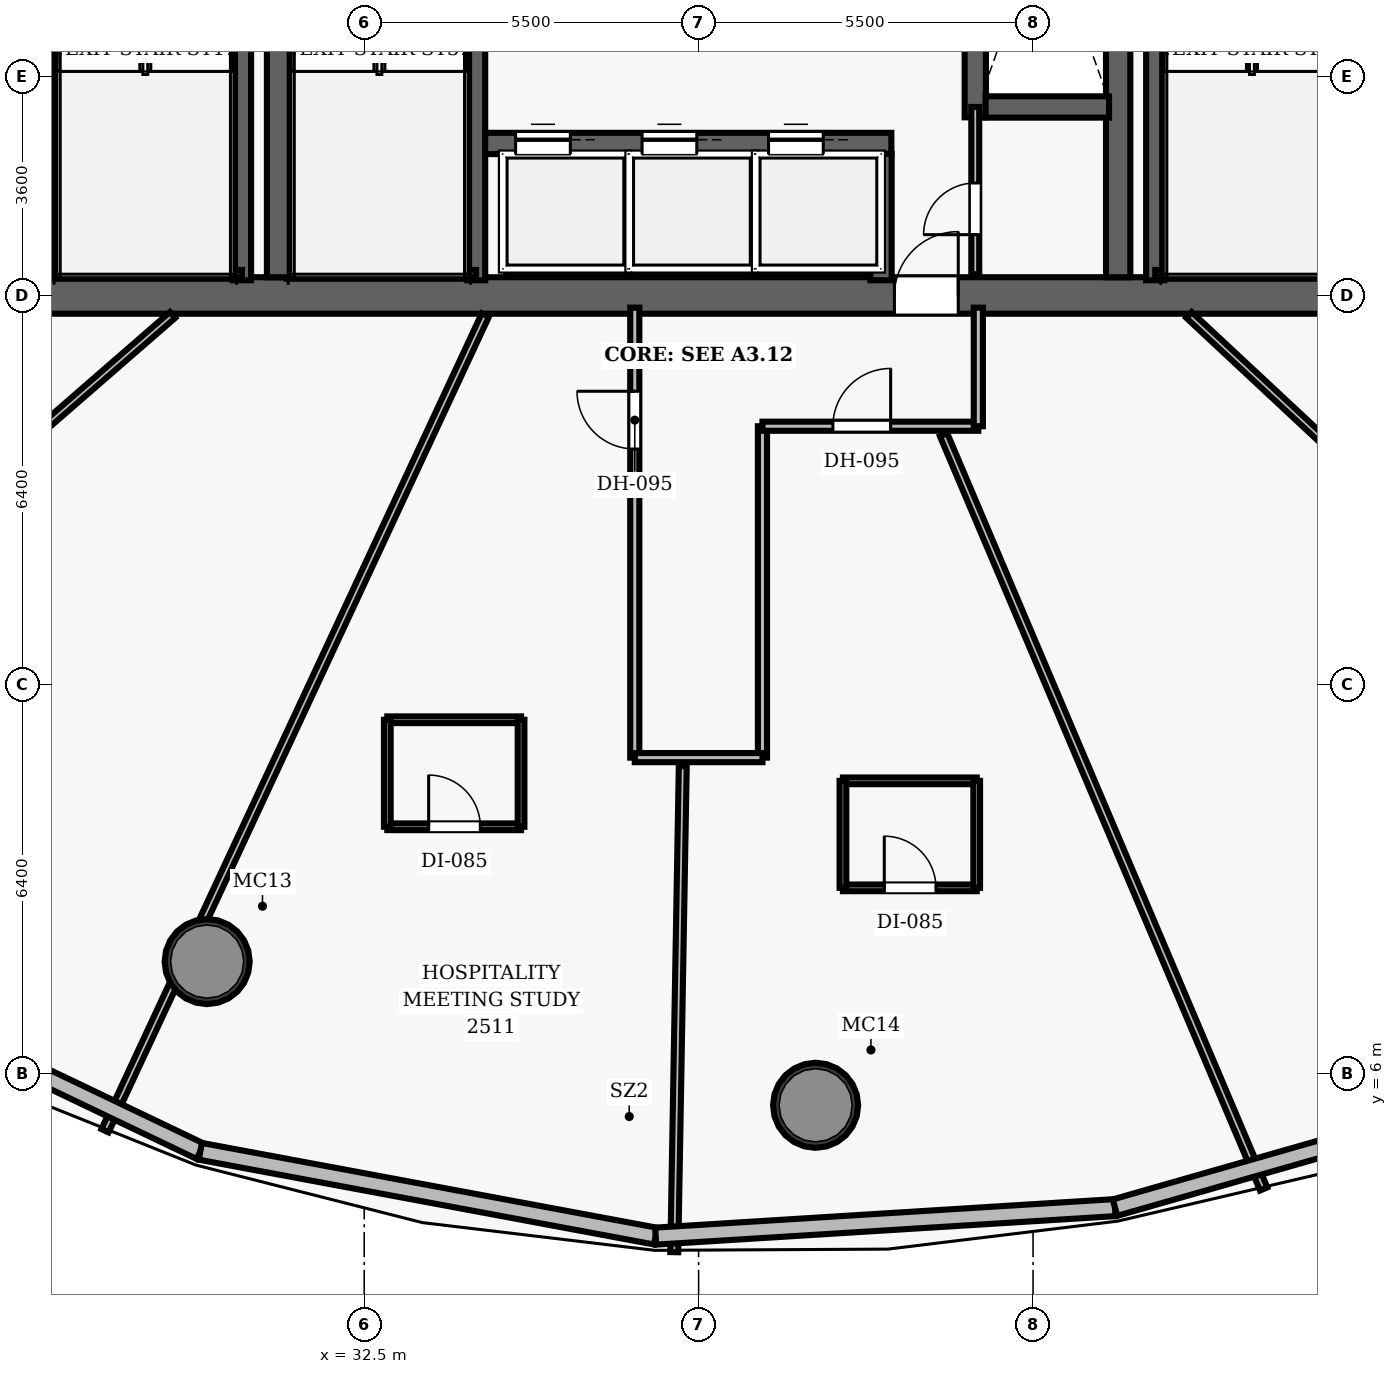
"""IFC4 building model, lengths in metres.
Left out: names, types, materials, properties, quantities, classifications, styles, units other than length and angle.
Written with IfcOpenShell. Run it as: python <this file> out.ifc"""

import sys

from ifc_helpers import new_model, si_unit, direction, frame, frame_2d, origin, origin_2d, place, context, subcontext, project, spatial, rectangle, hollow_circle, extrude, element, fill, save


model = new_model("IFC4")
c1 = context("Model", 3, precision=1e-05, world=origin(), true_north=direction((0.0, 1.0)))
c2 = subcontext(c1, "Body", "Model", "MODEL_VIEW")
j1 = project(units=[si_unit("LENGTHUNIT", "METRE"), si_unit("PLANEANGLEUNIT", "RADIAN")], contexts=[c1])
p1 = place(None, origin())
s1 = spatial("IfcSite", under=j1, at=p1, CompositionType="ELEMENT")
p2 = place(p1, origin())
s2 = spatial("IfcBuilding", under=s1, at=p2, CompositionType="ELEMENT")
p3 = place(p2, frame((0.0, 0.0, 106.3)))
s3 = spatial("IfcBuildingStorey", under=s2, at=p3, CompositionType="ELEMENT", Elevation=106.3)
p4 = place(p3, frame((26.7, 18.8, 0.0), z_axis=(0.0, 0.0, 1.0), x_axis=(1.0, 0.0, 0.0)))
e1 = element("IfcWall", 1, at=p4, inside=s3, PredefinedType="SHEAR", context=c2, shape_type="SweptSolid", body=[
    extrude(rectangle(XDim=22.6, YDim=0.6, at=frame_2d((11.3, 0.0))), origin(), (0.0, 0.0, 1.0), 3.5),
])
p5 = place(p4, frame((14.52, 0.0, 0.0)))
e2 = element("IfcOpeningElement", 2, at=p5, cuts=e1, PredefinedType="OPENING", context=c2, shape_type="SweptSolid", body=[
    extrude(rectangle(XDim=1.05, YDim=2.15, at=frame_2d((0.525, 1.075))), frame((0.0, 0.31, 0.0), z_axis=(0.0, -1.0, 0.0), x_axis=(1.0, 0.0, 0.0)), (0.0, 0.0, 1.0), 0.62),
])
for number, where, z_axis, x_axis in (
    (3, (31.1, 19.1, 0.0), (0.0, 0.0, 1.0), (0.0, 1.0, 0.0)),
    (4, (44.9, 19.1, 0.0), (0.0, 0.0, 1.0), (0.0, 1.0, 0.0)),
):
    element("IfcWall", number, at=place(p3, frame(where, z_axis=z_axis, x_axis=x_axis)), inside=s3, PredefinedType="SHEAR", context=c2, shape_type="SweptSolid", body=[
        extrude(rectangle(XDim=13.8, YDim=0.4, at=frame_2d((6.9, 0.0))), origin(), (0.0, 0.0, 1.0), 3.5),
    ])
for number, where, z_axis, x_axis in (
    (5, (29.917, 7.846, 0.0), (0.0, 0.0, 1.0), (1.0, 0.0, 0.0)),
    (6, (39.924, 5.483, 0.0), (0.0, 0.0, 1.0), (1.0, 0.0, 0.0)),
):
    element("IfcColumn", number, at=place(p3, frame(where, z_axis=z_axis, x_axis=x_axis)), inside=s3, PredefinedType="COLUMN", context=c2, shape_type="SweptSolid", body=[
        extrude(hollow_circle(Radius=0.7, WallThickness=0.055, at=origin_2d()), origin(), (0.0, 0.0, 1.0), 3.5),
    ])
p6 = place(p3, frame((30.49, 19.05, 0.0), z_axis=(0.0, 0.0, 1.0), x_axis=(0.0, 1.0, 0.0)))
e7 = element("IfcWall", 7, at=p6, inside=s3, PredefinedType="SHEAR", context=c2, shape_type="SweptSolid", body=[
    extrude(rectangle(XDim=7.5, YDim=0.3, at=frame_2d((3.75, 0.0))), origin(), (0.0, 0.0, 1.0), 3.5),
])
p7 = place(p3, frame((27.395, 19.1, 0.0), z_axis=(0.0, 0.0, 1.0), x_axis=(0.0, 1.0, 0.0)))
e8 = element("IfcWall", 8, at=p7, inside=s3, PredefinedType="SHEAR", context=c2, shape_type="SweptSolid", body=[
    extrude(rectangle(XDim=7.45, YDim=0.12, at=frame_2d((3.725, 0.0))), origin(), (0.0, 0.0, 1.0), 3.5),
])
p8 = place(p3, frame((27.395, 19.16, 0.0), z_axis=(0.0, 0.0, 1.0), x_axis=(1.0, 0.0, 0.0)))
e9 = element("IfcWall", 9, at=p8, inside=s3, PredefinedType="SHEAR", context=c2, shape_type="SweptSolid", body=[
    extrude(rectangle(XDim=3.095, YDim=0.12, at=frame_2d((1.547, 0.0))), origin(), (0.0, 0.0, 1.0), 3.5),
])
p9 = place(p3, frame((45.51, 19.05, 0.0), z_axis=(0.0, 0.0, 1.0), x_axis=(0.0, 1.0, 0.0)))
e10 = element("IfcWall", 10, at=p9, inside=s3, PredefinedType="SHEAR", context=c2, shape_type="SweptSolid", body=[
    extrude(rectangle(XDim=7.5, YDim=0.3, at=frame_2d((3.75, 0.0))), origin(), (0.0, 0.0, 1.0), 3.5),
])
p10 = place(p3, frame((45.51, 19.16, 0.0), z_axis=(0.0, 0.0, 1.0), x_axis=(1.0, 0.0, 0.0)))
e11 = element("IfcWall", 11, at=p10, inside=s3, PredefinedType="SHEAR", context=c2, shape_type="SweptSolid", body=[
    extrude(rectangle(XDim=3.095, YDim=0.12, at=frame_2d((1.547, 0.0))), origin(), (0.0, 0.0, 1.0), 3.5),
])
p11 = place(p3, frame((34.34, 19.05, 0.0), z_axis=(0.0, 0.0, 1.0), x_axis=(0.0, 1.0, 0.0)))
e12 = element("IfcWall", 12, at=p11, inside=s3, PredefinedType="SHEAR", context=c2, shape_type="SweptSolid", body=[
    extrude(rectangle(XDim=7.5, YDim=0.3, at=frame_2d((3.75, 0.0))), origin(), (0.0, 0.0, 1.0), 3.5),
])
p12 = place(p3, frame((31.3, 19.16, 0.0), z_axis=(0.0, 0.0, 1.0), x_axis=(1.0, 0.0, 0.0)))
e13 = element("IfcWall", 13, at=p12, inside=s3, PredefinedType="SHEAR", context=c2, shape_type="SweptSolid", body=[
    extrude(rectangle(XDim=3.04, YDim=0.12, at=frame_2d((1.52, 0.0))), origin(), (0.0, 0.0, 1.0), 3.5),
])
p13 = place(p3, frame((42.55, 21.73, 0.0), z_axis=(0.0, 0.0, 1.0), x_axis=(0.0, 1.0, 0.0)))
e14 = element("IfcWall", 14, at=p13, inside=s3, PredefinedType="SHEAR", context=c2, shape_type="SweptSolid", body=[
    extrude(rectangle(XDim=6.54, YDim=0.35, at=frame_2d((3.27, 0.0))), origin(), (0.0, 0.0, 1.0), 2.675),
])
p14 = place(p3, frame((42.72, 21.9, 0.0), z_axis=(0.0, 0.0, 1.0), x_axis=(1.0, 0.0, 0.0)))
e15 = element("IfcWall", 15, at=p14, inside=s3, PredefinedType="SHEAR", context=c2, shape_type="SweptSolid", body=[
    extrude(rectangle(XDim=2.03, YDim=0.35, at=frame_2d((1.015, 0.0))), origin(), (0.0, 0.0, 1.0), 2.675),
])
p15 = place(p3, frame((34.49, 21.3, 0.0), z_axis=(0.0, 0.0, 1.0), x_axis=(1.0, 0.0, 0.0)))
e16 = element("IfcWall", 16, at=p15, inside=s3, PredefinedType="SHEAR", context=c2, shape_type="SweptSolid", body=[
    extrude(rectangle(XDim=6.68, YDim=0.35, at=frame_2d((3.34, 0.0))), origin(), (0.0, 0.0, 1.0), 2.675),
])
p16 = place(p15, frame((0.5, 0.0, 0.0)))
e17 = element("IfcOpeningElement", 17, at=p16, cuts=e16, PredefinedType="OPENING", context=c2, shape_type="SweptSolid", body=[
    extrude(rectangle(XDim=0.9, YDim=2.15, at=frame_2d((0.45, 1.075))), frame((0.0, 0.185, 0.0), z_axis=(0.0, -1.0, 0.0), x_axis=(1.0, 0.0, 0.0)), (0.0, 0.0, 1.0), 0.37),
])
p17 = place(p15, frame((2.58, 0.0, 0.0)))
e18 = element("IfcOpeningElement", 18, at=p17, cuts=e16, PredefinedType="OPENING", context=c2, shape_type="SweptSolid", body=[
    extrude(rectangle(XDim=0.9, YDim=2.15, at=frame_2d((0.45, 1.075))), frame((0.0, 0.185, 0.0), z_axis=(0.0, -1.0, 0.0), x_axis=(1.0, 0.0, 0.0)), (0.0, 0.0, 1.0), 0.37),
])
p18 = place(p15, frame((4.66, 0.0, 0.0)))
e19 = element("IfcOpeningElement", 19, at=p18, cuts=e16, PredefinedType="OPENING", context=c2, shape_type="SweptSolid", body=[
    extrude(rectangle(XDim=0.9, YDim=2.15, at=frame_2d((0.45, 1.075))), frame((0.0, 0.185, 0.0), z_axis=(0.0, -1.0, 0.0), x_axis=(1.0, 0.0, 0.0)), (0.0, 0.0, 1.0), 0.37),
])
p19 = place(p3, frame((41.0, 19.05, 0.0), z_axis=(0.0, 0.0, 1.0), x_axis=(0.0, 1.0, 0.0)))
e20 = element("IfcWall", 20, at=p19, inside=s3, PredefinedType="SHEAR", context=c2, shape_type="SweptSolid", body=[
    extrude(rectangle(XDim=2.08, YDim=0.35, at=frame_2d((1.04, 0.0))), origin(), (0.0, 0.0, 1.0), 2.675),
])
p20 = place(p3, frame((42.55, 19.15, 0.0), z_axis=(0.0, 0.0, 1.0), x_axis=(0.0, 1.0, 0.0)))
e21 = element("IfcWall", 21, at=p20, inside=s3, PredefinedType="PARTITIONING", context=c2, shape_type="SweptSolid", body=[
    extrude(rectangle(XDim=2.75, YDim=0.13, at=frame_2d((1.375, 0.0))), origin(), (0.0, 0.0, 1.0), 2.675),
])
p21 = place(p20, frame((0.65, 0.0, 0.0)))
e22 = element("IfcOpeningElement", 22, at=p21, cuts=e21, PredefinedType="OPENING", context=c2, shape_type="SweptSolid", body=[
    extrude(rectangle(XDim=0.85, YDim=2.1, at=frame_2d((0.425, 1.05))), frame((0.0, 0.075, 0.0), z_axis=(0.0, -1.0, 0.0), x_axis=(1.0, 0.0, 0.0)), (0.0, 0.0, 1.0), 0.15),
])
p22 = place(p3, frame((36.95, 11.2, 0.0), z_axis=(0.0, 0.0, 1.0), x_axis=(0.0, 1.0, 0.0)))
e23 = element("IfcWall", 23, at=p22, inside=s3, PredefinedType="PARTITIONING", context=c2, shape_type="SweptSolid", body=[
    extrude(rectangle(XDim=7.4, YDim=0.15, at=frame_2d((3.7, 0.0))), origin(), (0.0, 0.0, 1.0), 2.675),
])
p23 = place(p22, frame((5.075, 0.0, 0.0)))
e24 = element("IfcOpeningElement", 24, at=p23, cuts=e23, PredefinedType="OPENING", context=c2, shape_type="SweptSolid", body=[
    extrude(rectangle(XDim=0.95, YDim=2.15, at=frame_2d((0.475, 1.075))), frame((0.0, 0.085, 0.0), z_axis=(0.0, -1.0, 0.0), x_axis=(1.0, 0.0, 0.0)), (0.0, 0.0, 1.0), 0.17),
])
p24 = place(p3, frame((39.05, 11.2, 0.0), z_axis=(0.0, 0.0, 1.0), x_axis=(0.0, 1.0, 0.0)))
e25 = element("IfcWall", 25, at=p24, inside=s3, PredefinedType="PARTITIONING", context=c2, shape_type="SweptSolid", body=[
    extrude(rectangle(XDim=5.45, YDim=0.15, at=frame_2d((2.725, 0.0))), origin(), (0.0, 0.0, 1.0), 2.675),
])
p25 = place(p3, frame((39.05, 16.65, 0.0), z_axis=(0.0, 0.0, 1.0), x_axis=(1.0, 0.0, 0.0)))
e26 = element("IfcWall", 26, at=p25, inside=s3, PredefinedType="PARTITIONING", context=c2, shape_type="SweptSolid", body=[
    extrude(rectangle(XDim=3.55, YDim=0.15, at=frame_2d((1.775, 0.0))), origin(), (0.0, 0.0, 1.0), 2.675),
])
p26 = place(p25, frame((1.158, 0.0, 0.0)))
e27 = element("IfcOpeningElement", 27, at=p26, cuts=e26, PredefinedType="OPENING", context=c2, shape_type="SweptSolid", body=[
    extrude(rectangle(XDim=0.95, YDim=2.15, at=frame_2d((0.475, 1.075))), frame((0.0, 0.085, 0.0), z_axis=(0.0, -1.0, 0.0), x_axis=(1.0, 0.0, 0.0)), (0.0, 0.0, 1.0), 0.17),
])
p27 = place(p3, frame((42.6, 16.65, 0.0), z_axis=(0.0, 0.0, 1.0), x_axis=(0.0, 1.0, 0.0)))
e28 = element("IfcWall", 28, at=p27, inside=s3, PredefinedType="PARTITIONING", context=c2, shape_type="SweptSolid", body=[
    extrude(rectangle(XDim=1.95, YDim=0.15, at=frame_2d((0.975, 0.0))), origin(), (0.0, 0.0, 1.0), 2.675),
])
p28 = place(p3, frame((36.95, 11.2, 0.0), z_axis=(0.0, 0.0, 1.0), x_axis=(1.0, 0.0, 0.0)))
e29 = element("IfcWall", 29, at=p28, inside=s3, PredefinedType="PARTITIONING", context=c2, shape_type="SweptSolid", body=[
    extrude(rectangle(XDim=2.1, YDim=0.15, at=frame_2d((1.05, 0.0))), origin(), (0.0, 0.0, 1.0), 2.675),
])
p29 = place(p3, frame((29.349, 18.48, 0.0), z_axis=(0.0, 0.0, 1.0), x_axis=(-0.754706894701, -0.656062118317, 0.0)))
e30 = element("IfcWall", 30, at=p29, inside=s3, PredefinedType="PARTITIONING", context=c2, shape_type="SweptSolid", body=[
    extrude(rectangle(XDim=12.805, YDim=0.13, at=frame_2d((6.403, 0.0))), origin(), (0.0, 0.0, 1.0), 2.675),
])
p30 = place(p3, frame((34.493, 18.48, 0.0), z_axis=(0.0, 0.0, 1.0), x_axis=(-0.422624514594, -0.906304871257, 0.0)))
e31 = element("IfcWall", 31, at=p30, inside=s3, PredefinedType="PARTITIONING", context=c2, shape_type="SweptSolid", body=[
    extrude(rectangle(XDim=14.803, YDim=0.13, at=frame_2d((7.401, 0.0))), origin(), (0.0, 0.0, 1.0), 2.675),
])
p31 = place(p3, frame((37.739, 11.06, 0.0), z_axis=(0.0, 0.0, 1.0), x_axis=(-0.017468317737, -0.999847417297, 0.0)))
e32 = element("IfcWall", 32, at=p31, inside=s3, PredefinedType="PARTITIONING", context=c2, shape_type="SweptSolid", body=[
    extrude(rectangle(XDim=7.994, YDim=0.13, at=frame_2d((3.997, 0.0))), origin(), (0.0, 0.0, 1.0), 2.675),
])
p32 = place(p3, frame((42.028, 16.51, 0.0), z_axis=(0.0, 0.0, 1.0), x_axis=(0.390724326838, -0.920507740552, 0.0)))
e33 = element("IfcWall", 33, at=p32, inside=s3, PredefinedType="PARTITIONING", context=c2, shape_type="SweptSolid", body=[
    extrude(rectangle(XDim=13.475, YDim=0.13, at=frame_2d((6.737, 0.0))), origin(), (0.0, 0.0, 1.0), 2.675),
])
p33 = place(p3, frame((46.064, 18.48, 0.0), z_axis=(0.0, 0.0, 1.0), x_axis=(0.73135803083, -0.681993717523, 0.0)))
e34 = element("IfcWall", 34, at=p33, inside=s3, PredefinedType="PARTITIONING", context=c2, shape_type="SweptSolid", body=[
    extrude(rectangle(XDim=15.04, YDim=0.13, at=frame_2d((7.52, 0.0))), origin(), (0.0, 0.0, 1.0), 2.675),
])
p34 = place(p3, frame((32.88, 10.063, 0.0), z_axis=(0.0, 0.0, 1.0), x_axis=(1.0, 0.0, 0.0)))
e35 = element("IfcWall", 35, at=p34, inside=s3, PredefinedType="PARTITIONING", context=c2, shape_type="SweptSolid", body=[
    extrude(rectangle(XDim=2.2, YDim=0.11, at=frame_2d((1.1, 0.0))), origin(), (0.0, 0.0, 1.0), 2.675),
])
p35 = place(p34, frame((0.68, 0.0, 0.0)))
e36 = element("IfcOpeningElement", 36, at=p35, cuts=e35, PredefinedType="OPENING", context=c2, shape_type="SweptSolid", body=[
    extrude(rectangle(XDim=0.85, YDim=2.1, at=frame_2d((0.425, 1.05))), frame((0.0, 0.065, 0.0), z_axis=(0.0, -1.0, 0.0), x_axis=(1.0, 0.0, 0.0)), (0.0, 0.0, 1.0), 0.13),
])
p36 = place(p3, frame((32.88, 11.823, 0.0), z_axis=(0.0, 0.0, 1.0), x_axis=(1.0, 0.0, 0.0)))
e37 = element("IfcWall", 37, at=p36, inside=s3, PredefinedType="PARTITIONING", context=c2, shape_type="SweptSolid", body=[
    extrude(rectangle(XDim=2.2, YDim=0.11, at=frame_2d((1.1, 0.0))), origin(), (0.0, 0.0, 1.0), 2.675),
])
for number, where, z_axis, x_axis in (
    (38, (32.88, 10.063, 0.0), (0.0, 0.0, 1.0), (0.0, 1.0, 0.0)),
    (39, (35.08, 10.063, 0.0), (0.0, 0.0, 1.0), (0.0, 1.0, 0.0)),
):
    element("IfcWall", number, at=place(p3, frame(where, z_axis=z_axis, x_axis=x_axis)), inside=s3, PredefinedType="PARTITIONING", context=c2, shape_type="SweptSolid", body=[
        extrude(rectangle(XDim=1.76, YDim=0.11, at=frame_2d((0.88, 0.0))), origin(), (0.0, 0.0, 1.0), 2.675),
    ])
p37 = place(p3, frame((40.374, 9.058, 0.0), z_axis=(0.0, 0.0, 1.0), x_axis=(1.0, 0.0, 0.0)))
e40 = element("IfcWall", 40, at=p37, inside=s3, PredefinedType="PARTITIONING", context=c2, shape_type="SweptSolid", body=[
    extrude(rectangle(XDim=2.2, YDim=0.11, at=frame_2d((1.1, 0.0))), origin(), (0.0, 0.0, 1.0), 2.675),
])
p38 = place(p37, frame((0.68, 0.0, 0.0)))
e41 = element("IfcOpeningElement", 41, at=p38, cuts=e40, PredefinedType="OPENING", context=c2, shape_type="SweptSolid", body=[
    extrude(rectangle(XDim=0.85, YDim=2.1, at=frame_2d((0.425, 1.05))), frame((0.0, 0.065, 0.0), z_axis=(0.0, -1.0, 0.0), x_axis=(1.0, 0.0, 0.0)), (0.0, 0.0, 1.0), 0.13),
])
p39 = place(p3, frame((40.374, 10.818, 0.0), z_axis=(0.0, 0.0, 1.0), x_axis=(1.0, 0.0, 0.0)))
e42 = element("IfcWall", 42, at=p39, inside=s3, PredefinedType="PARTITIONING", context=c2, shape_type="SweptSolid", body=[
    extrude(rectangle(XDim=2.2, YDim=0.11, at=frame_2d((1.1, 0.0))), origin(), (0.0, 0.0, 1.0), 2.675),
])
for number, where, z_axis, x_axis in (
    (43, (40.374, 9.058, 0.0), (0.0, 0.0, 1.0), (0.0, 1.0, 0.0)),
    (44, (42.573, 9.058, 0.0), (0.0, 0.0, 1.0), (0.0, 1.0, 0.0)),
):
    element("IfcWall", number, at=place(p3, frame(where, z_axis=z_axis, x_axis=x_axis)), inside=s3, PredefinedType="PARTITIONING", context=c2, shape_type="SweptSolid", body=[
        extrude(rectangle(XDim=1.76, YDim=0.11, at=frame_2d((0.88, 0.0))), origin(), (0.0, 0.0, 1.0), 2.675),
    ])
p40 = place(p3, frame((29.805, 4.726, 0.0), z_axis=(0.0, 0.0, 1.0), x_axis=(-0.902222070654, 0.431271764928, 0.0)))
e45 = element("IfcWall", 45, at=p40, inside=s3, PredefinedType="SOLIDWALL", context=c2, shape_type="SweptSolid", body=[
    extrude(rectangle(XDim=7.617, YDim=0.28, at=frame_2d((3.809, 0.0))), origin(), (0.0, 0.0, 1.0), 3.26),
])
p41 = place(p3, frame((37.294, 3.331, 0.0), z_axis=(0.0, 0.0, 1.0), x_axis=(-0.983088475279, 0.183131236479, 0.0)))
e46 = element("IfcWall", 46, at=p41, inside=s3, PredefinedType="SOLIDWALL", context=c2, shape_type="SweptSolid", body=[
    extrude(rectangle(XDim=7.618, YDim=0.28, at=frame_2d((3.809, 0.0))), origin(), (0.0, 0.0, 1.0), 3.26),
])
p42 = place(p3, frame((44.848, 3.8, 0.0), z_axis=(0.0, 0.0, 1.0), x_axis=(-0.99808058992, -0.061928475073, 0.0)))
e47 = element("IfcWall", 47, at=p42, inside=s3, PredefinedType="SOLIDWALL", context=c2, shape_type="SweptSolid", body=[
    extrude(rectangle(XDim=7.569, YDim=0.28, at=frame_2d((3.785, 0.0))), origin(), (0.0, 0.0, 1.0), 3.26),
])
p43 = place(p3, frame((51.858, 5.806, 0.0), z_axis=(0.0, 0.0, 1.0), x_axis=(-0.961379778043, -0.275225221172, 0.0)))
e48 = element("IfcWall", 48, at=p43, inside=s3, PredefinedType="SOLIDWALL", context=c2, shape_type="SweptSolid", body=[
    extrude(rectangle(XDim=7.292, YDim=0.28, at=frame_2d((3.646, 0.0))), origin(), (0.0, 0.0, 1.0), 3.26),
])
p44 = place(p5, origin())
e49 = element("IfcDoor", 49, at=p44, inside=s3, OperationType="SINGLE_SWING_RIGHT", PredefinedType="DOOR", context=c2, shape_type="SweptSolid", body=[
    extrude(rectangle(XDim=1.05, YDim=2.15, at=frame_2d((0.525, 1.075))), frame((0.0, 0.025, 0.0), z_axis=(0.0, -1.0, 0.0), x_axis=(1.0, 0.0, 0.0)), (0.0, 0.0, 1.0), 0.05),
])
fill(e2, e49)
p45 = place(p21, origin())
e50 = element("IfcDoor", 50, at=p45, inside=s3, OperationType="SINGLE_SWING_LEFT", PredefinedType="DOOR", context=c2, shape_type="SweptSolid", body=[
    extrude(rectangle(XDim=0.85, YDim=2.1, at=frame_2d((0.425, 1.05))), frame((0.0, 0.025, 0.0), z_axis=(0.0, -1.0, 0.0), x_axis=(1.0, 0.0, 0.0)), (0.0, 0.0, 1.0), 0.05),
])
fill(e22, e50)
p46 = place(p23, origin())
e51 = element("IfcDoor", 51, at=p46, inside=s3, OperationType="SINGLE_SWING_RIGHT", PredefinedType="DOOR", context=c2, shape_type="SweptSolid", body=[
    extrude(rectangle(XDim=0.95, YDim=2.15, at=frame_2d((0.475, 1.075))), frame((0.0, 0.025, 0.0), z_axis=(0.0, -1.0, 0.0), x_axis=(1.0, 0.0, 0.0)), (0.0, 0.0, 1.0), 0.05),
])
fill(e24, e51)
p47 = place(p35, origin())
e52 = element("IfcDoor", 52, at=p47, inside=s3, OperationType="SINGLE_SWING_LEFT", PredefinedType="DOOR", context=c2, shape_type="SweptSolid", body=[
    extrude(rectangle(XDim=0.85, YDim=2.1, at=frame_2d((0.425, 1.05))), frame((0.0, 0.025, 0.0), z_axis=(0.0, -1.0, 0.0), x_axis=(1.0, 0.0, 0.0)), (0.0, 0.0, 1.0), 0.05),
])
fill(e36, e52)
p48 = place(p26, origin())
e53 = element("IfcDoor", 53, at=p48, inside=s3, OperationType="SINGLE_SWING_RIGHT", PredefinedType="DOOR", context=c2, shape_type="SweptSolid", body=[
    extrude(rectangle(XDim=0.95, YDim=2.15, at=frame_2d((0.475, 1.075))), frame((0.0, 0.025, 0.0), z_axis=(0.0, -1.0, 0.0), x_axis=(1.0, 0.0, 0.0)), (0.0, 0.0, 1.0), 0.05),
])
fill(e27, e53)
p49 = place(p38, origin())
e54 = element("IfcDoor", 54, at=p49, inside=s3, OperationType="SINGLE_SWING_LEFT", PredefinedType="DOOR", context=c2, shape_type="SweptSolid", body=[
    extrude(rectangle(XDim=0.85, YDim=2.1, at=frame_2d((0.425, 1.05))), frame((0.0, 0.025, 0.0), z_axis=(0.0, -1.0, 0.0), x_axis=(1.0, 0.0, 0.0)), (0.0, 0.0, 1.0), 0.05),
])
fill(e41, e54)
p50 = place(p16, origin())
e55 = element("IfcDoor", 55, at=p50, inside=s3, OperationType="SLIDING_TO_LEFT", PredefinedType="DOOR", context=c2, shape_type="SweptSolid", body=[
    extrude(rectangle(XDim=0.9, YDim=2.15, at=frame_2d((0.45, 1.075))), frame((0.0, 0.025, 0.0), z_axis=(0.0, -1.0, 0.0), x_axis=(1.0, 0.0, 0.0)), (0.0, 0.0, 1.0), 0.05),
])
fill(e17, e55)
p51 = place(p17, origin())
e56 = element("IfcDoor", 56, at=p51, inside=s3, OperationType="SLIDING_TO_LEFT", PredefinedType="DOOR", context=c2, shape_type="SweptSolid", body=[
    extrude(rectangle(XDim=0.9, YDim=2.15, at=frame_2d((0.45, 1.075))), frame((0.0, 0.025, 0.0), z_axis=(0.0, -1.0, 0.0), x_axis=(1.0, 0.0, 0.0)), (0.0, 0.0, 1.0), 0.05),
])
fill(e18, e56)
p52 = place(p18, origin())
e57 = element("IfcDoor", 57, at=p52, inside=s3, OperationType="SLIDING_TO_LEFT", PredefinedType="DOOR", context=c2, shape_type="SweptSolid", body=[
    extrude(rectangle(XDim=0.9, YDim=2.15, at=frame_2d((0.45, 1.075))), frame((0.0, 0.025, 0.0), z_axis=(0.0, -1.0, 0.0), x_axis=(1.0, 0.0, 0.0)), (0.0, 0.0, 1.0), 0.05),
])
fill(e19, e57)
save(model, sys.argv[1])
